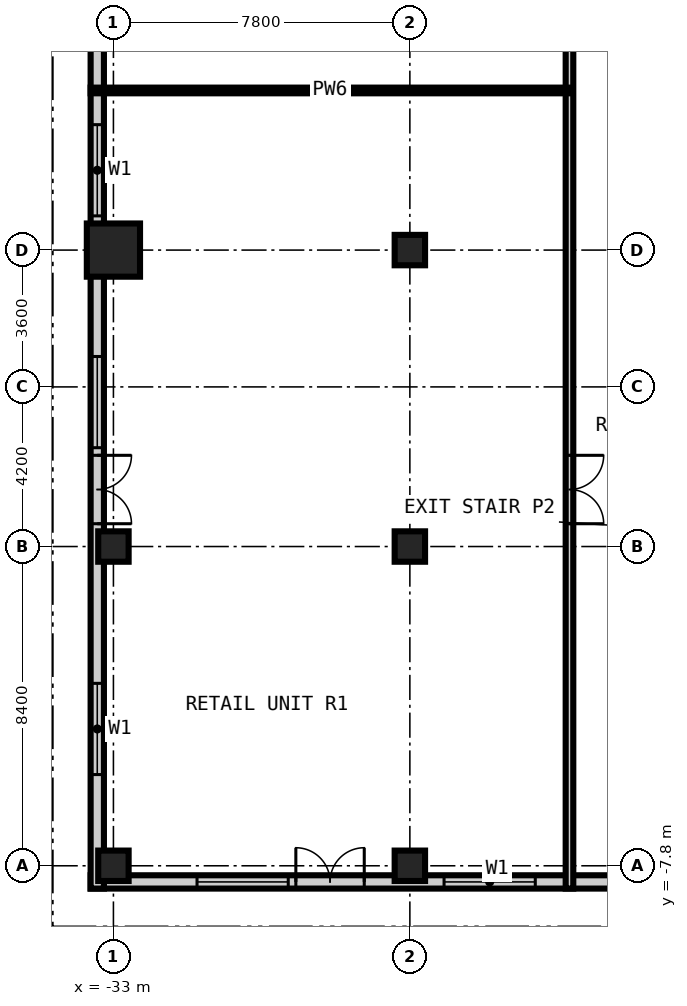
"""IFC4 building model, lengths in metres.
Left out: names, types, materials, properties, quantities, classifications, styles, units other than length and angle.
Written with IfcOpenShell. Run it as: python <this file> out.ifc"""

import sys

from ifc_helpers import new_model, si_unit, direction, frame, frame_2d, origin, origin_2d, place, context, subcontext, project, spatial, rectangle, extrude, element, fill, save


model = new_model("IFC4")
c1 = context("Model", 3, precision=1e-05, world=origin(), true_north=direction((0.0, 1.0)))
c2 = subcontext(c1, "Body", "Model", "MODEL_VIEW")
j1 = project(units=[si_unit("LENGTHUNIT", "METRE"), si_unit("PLANEANGLEUNIT", "RADIAN")], contexts=[c1])
p1 = place(None, origin())
s1 = spatial("IfcSite", under=j1, at=p1, CompositionType="ELEMENT")
p2 = place(p1, origin())
s2 = spatial("IfcBuilding", under=s1, at=p2, CompositionType="ELEMENT")
p3 = place(p2, origin())
s3 = spatial("IfcBuildingStorey", under=s2, at=p3, CompositionType="ELEMENT", Elevation=0.0)
for number, where, z_axis, x_axis in (
    (1, (-33.0, -7.8, -0.5), (0.0, 0.0, 1.0), (1.0, 0.0, 0.0)),
    (2, (-33.0, 0.6, -0.5), (0.0, 0.0, 1.0), (1.0, 0.0, 0.0)),
):
    element("IfcColumn", number, at=place(p3, frame(where, z_axis=z_axis, x_axis=x_axis)), inside=s3, PredefinedType="COLUMN", context=c2, shape_type="SweptSolid", body=[
        extrude(rectangle(XDim=0.8, YDim=0.8, at=origin_2d()), origin(), (0.0, 0.0, 1.0), 6.2),
    ])
p4 = place(p3, frame((-33.0, 8.4, -0.3), z_axis=(0.0, 0.0, 1.0), x_axis=(1.0, 0.0, 0.0)))
e3 = element("IfcColumn", 3, at=p4, inside=s3, PredefinedType="COLUMN", context=c2, shape_type="SweptSolid", body=[
    extrude(rectangle(XDim=1.4, YDim=1.4, at=origin_2d()), origin(), (0.0, 0.0, 1.0), 6.0),
])
for number, where, z_axis, x_axis in (
    (4, (-25.2, -7.8, -0.5), (0.0, 0.0, 1.0), (1.0, 0.0, 0.0)),
    (5, (-25.2, 0.6, -0.5), (0.0, 0.0, 1.0), (1.0, 0.0, 0.0)),
):
    element("IfcColumn", number, at=place(p3, frame(where, z_axis=z_axis, x_axis=x_axis)), inside=s3, PredefinedType="COLUMN", context=c2, shape_type="SweptSolid", body=[
        extrude(rectangle(XDim=0.8, YDim=0.8, at=origin_2d()), origin(), (0.0, 0.0, 1.0), 6.2),
    ])
p5 = place(p3, frame((-25.2, 8.4, -0.3), z_axis=(0.0, 0.0, 1.0), x_axis=(1.0, 0.0, 0.0)))
e6 = element("IfcColumn", 6, at=p5, inside=s3, PredefinedType="COLUMN", context=c2, shape_type="SweptSolid", body=[
    extrude(rectangle(XDim=0.8, YDim=0.8, at=origin_2d()), origin(), (0.0, 0.0, 1.0), 6.0),
])
p6 = place(p3, frame((-33.6, -8.225, 0.0), z_axis=(0.0, 0.0, 1.0), x_axis=(1.0, 0.0, 0.0)))
e7 = element("IfcWall", 7, at=p6, inside=s3, PredefinedType="SOLIDWALL", context=c2, shape_type="SweptSolid", body=[
    extrude(rectangle(XDim=92.4, YDim=0.35, at=frame_2d((46.2, 0.0))), origin(), (0.0, 0.0, 1.0), 5.7),
])
p7 = place(p6, frame((5.4, 0.0, 0.0)))
e8 = element("IfcOpeningElement", 8, at=p7, cuts=e7, PredefinedType="OPENING", context=c2, shape_type="SweptSolid", body=[
    extrude(rectangle(XDim=1.8, YDim=2.7, at=frame_2d((0.9, 1.35))), frame((0.0, 0.185, 0.0), z_axis=(0.0, -1.0, 0.0), x_axis=(1.0, 0.0, 0.0)), (0.0, 0.0, 1.0), 0.37),
])
p8 = place(p6, frame((2.8, 0.0, 0.9)))
e9 = element("IfcOpeningElement", 9, at=p8, cuts=e7, PredefinedType="OPENING", context=c2, shape_type="SweptSolid", body=[
    extrude(rectangle(XDim=2.4, YDim=2.4, at=frame_2d((1.2, 1.2))), frame((0.0, 0.185, 0.0), z_axis=(0.0, -1.0, 0.0), x_axis=(1.0, 0.0, 0.0)), (0.0, 0.0, 1.0), 0.37),
])
p9 = place(p6, frame((9.3, 0.0, 0.9)))
e10 = element("IfcOpeningElement", 10, at=p9, cuts=e7, PredefinedType="OPENING", context=c2, shape_type="SweptSolid", body=[
    extrude(rectangle(XDim=2.4, YDim=2.4, at=frame_2d((1.2, 1.2))), frame((0.0, 0.185, 0.0), z_axis=(0.0, -1.0, 0.0), x_axis=(1.0, 0.0, 0.0)), (0.0, 0.0, 1.0), 0.37),
])
p10 = place(p6, frame((13.8, 0.0, 0.9)))
e11 = element("IfcOpeningElement", 11, at=p10, cuts=e7, PredefinedType="OPENING", context=c2, shape_type="SweptSolid", body=[
    extrude(rectangle(XDim=2.4, YDim=2.4, at=frame_2d((1.2, 1.2))), frame((0.0, 0.185, 0.0), z_axis=(0.0, -1.0, 0.0), x_axis=(1.0, 0.0, 0.0)), (0.0, 0.0, 1.0), 0.37),
])
p11 = place(p6, frame((19.3, 0.0, 0.0)))
e12 = element("IfcOpeningElement", 12, at=p11, cuts=e7, PredefinedType="OPENING", context=c2, shape_type="SweptSolid", body=[
    extrude(rectangle(XDim=1.2, YDim=2.4, at=frame_2d((0.6, 1.2))), frame((0.0, 0.185, 0.0), z_axis=(0.0, -1.0, 0.0), x_axis=(1.0, 0.0, 0.0)), (0.0, 0.0, 1.0), 0.37),
])
p12 = place(p6, frame((26.8, 0.0, 0.0)))
e13 = element("IfcOpeningElement", 13, at=p12, cuts=e7, PredefinedType="OPENING", context=c2, shape_type="SweptSolid", body=[
    extrude(rectangle(XDim=2.4, YDim=3.0, at=frame_2d((1.2, 1.5))), frame((0.0, 0.185, 0.0), z_axis=(0.0, -1.0, 0.0), x_axis=(1.0, 0.0, 0.0)), (0.0, 0.0, 1.0), 0.37),
])
p13 = place(p6, frame((36.9, 0.0, 0.0)))
e14 = element("IfcOpeningElement", 14, at=p13, cuts=e7, PredefinedType="OPENING", context=c2, shape_type="SweptSolid", body=[
    extrude(rectangle(XDim=1.8, YDim=2.4, at=frame_2d((0.9, 1.2))), frame((0.0, 0.185, 0.0), z_axis=(0.0, -1.0, 0.0), x_axis=(1.0, 0.0, 0.0)), (0.0, 0.0, 1.0), 0.37),
])
p14 = place(p6, frame((38.9, 0.0, 0.9)))
e15 = element("IfcOpeningElement", 15, at=p14, cuts=e7, PredefinedType="OPENING", context=c2, shape_type="SweptSolid", body=[
    extrude(rectangle(XDim=2.4, YDim=2.4, at=frame_2d((1.2, 1.2))), frame((0.0, 0.185, 0.0), z_axis=(0.0, -1.0, 0.0), x_axis=(1.0, 0.0, 0.0)), (0.0, 0.0, 1.0), 0.37),
])
p15 = place(p6, frame((53.7, 0.0, 0.0)))
e16 = element("IfcOpeningElement", 16, at=p15, cuts=e7, PredefinedType="OPENING", context=c2, shape_type="SweptSolid", body=[
    extrude(rectangle(XDim=1.8, YDim=2.4, at=frame_2d((0.9, 1.2))), frame((0.0, 0.185, 0.0), z_axis=(0.0, -1.0, 0.0), x_axis=(1.0, 0.0, 0.0)), (0.0, 0.0, 1.0), 0.37),
])
p16 = place(p6, frame((51.1, 0.0, 0.9)))
e17 = element("IfcOpeningElement", 17, at=p16, cuts=e7, PredefinedType="OPENING", context=c2, shape_type="SweptSolid", body=[
    extrude(rectangle(XDim=2.4, YDim=2.4, at=frame_2d((1.2, 1.2))), frame((0.0, 0.185, 0.0), z_axis=(0.0, -1.0, 0.0), x_axis=(1.0, 0.0, 0.0)), (0.0, 0.0, 1.0), 0.37),
])
p17 = place(p6, frame((61.8, 0.0, 0.0)))
e18 = element("IfcOpeningElement", 18, at=p17, cuts=e7, PredefinedType="OPENING", context=c2, shape_type="SweptSolid", body=[
    extrude(rectangle(XDim=2.4, YDim=3.0, at=frame_2d((1.2, 1.5))), frame((0.0, 0.185, 0.0), z_axis=(0.0, -1.0, 0.0), x_axis=(1.0, 0.0, 0.0)), (0.0, 0.0, 1.0), 0.37),
])
p18 = place(p6, frame((72.7, 0.0, 0.9)))
e19 = element("IfcOpeningElement", 19, at=p18, cuts=e7, PredefinedType="OPENING", context=c2, shape_type="SweptSolid", body=[
    extrude(rectangle(XDim=2.4, YDim=2.4, at=frame_2d((1.2, 1.2))), frame((0.0, 0.185, 0.0), z_axis=(0.0, -1.0, 0.0), x_axis=(1.0, 0.0, 0.0)), (0.0, 0.0, 1.0), 0.37),
])
p19 = place(p6, frame((81.1, 0.0, 0.9)))
e20 = element("IfcOpeningElement", 20, at=p19, cuts=e7, PredefinedType="OPENING", context=c2, shape_type="SweptSolid", body=[
    extrude(rectangle(XDim=2.4, YDim=2.4, at=frame_2d((1.2, 1.2))), frame((0.0, 0.185, 0.0), z_axis=(0.0, -1.0, 0.0), x_axis=(1.0, 0.0, 0.0)), (0.0, 0.0, 1.0), 0.37),
])
p20 = place(p6, frame((88.9, 0.0, 0.9)))
e21 = element("IfcOpeningElement", 21, at=p20, cuts=e7, PredefinedType="OPENING", context=c2, shape_type="SweptSolid", body=[
    extrude(rectangle(XDim=2.4, YDim=2.4, at=frame_2d((1.2, 1.2))), frame((0.0, 0.185, 0.0), z_axis=(0.0, -1.0, 0.0), x_axis=(1.0, 0.0, 0.0)), (0.0, 0.0, 1.0), 0.37),
])
p21 = place(p3, frame((-33.425, 58.8, 0.0), z_axis=(0.0, 0.0, 1.0), x_axis=(0.0, -1.0, 0.0)))
e22 = element("IfcWall", 22, at=p21, inside=s3, PredefinedType="SOLIDWALL", context=c2, shape_type="SweptSolid", body=[
    extrude(rectangle(XDim=67.2, YDim=0.35, at=frame_2d((33.6, 0.0))), origin(), (0.0, 0.0, 1.0), 5.7),
])
p22 = place(p21, frame((55.8, 0.0, 0.0)))
e23 = element("IfcOpeningElement", 23, at=p22, cuts=e22, PredefinedType="OPENING", context=c2, shape_type="SweptSolid", body=[
    extrude(rectangle(XDim=1.8, YDim=2.7, at=frame_2d((0.9, 1.35))), frame((0.0, 0.185, 0.0), z_axis=(0.0, -1.0, 0.0), x_axis=(1.0, 0.0, 0.0)), (0.0, 0.0, 1.0), 0.37),
])
p23 = place(p21, frame((61.8, 0.0, 0.9)))
e24 = element("IfcOpeningElement", 24, at=p23, cuts=e22, PredefinedType="OPENING", context=c2, shape_type="SweptSolid", body=[
    extrude(rectangle(XDim=2.4, YDim=2.4, at=frame_2d((1.2, 1.2))), frame((0.0, 0.185, 0.0), z_axis=(0.0, -1.0, 0.0), x_axis=(1.0, 0.0, 0.0)), (0.0, 0.0, 1.0), 0.37),
])
p24 = place(p21, frame((53.2, 0.0, 0.9)))
e25 = element("IfcOpeningElement", 25, at=p24, cuts=e22, PredefinedType="OPENING", context=c2, shape_type="SweptSolid", body=[
    extrude(rectangle(XDim=2.4, YDim=2.4, at=frame_2d((1.2, 1.2))), frame((0.0, 0.185, 0.0), z_axis=(0.0, -1.0, 0.0), x_axis=(1.0, 0.0, 0.0)), (0.0, 0.0, 1.0), 0.37),
])
p25 = place(p21, frame((47.1, 0.0, 0.9)))
e26 = element("IfcOpeningElement", 26, at=p25, cuts=e22, PredefinedType="OPENING", context=c2, shape_type="SweptSolid", body=[
    extrude(rectangle(XDim=2.4, YDim=2.4, at=frame_2d((1.2, 1.2))), frame((0.0, 0.185, 0.0), z_axis=(0.0, -1.0, 0.0), x_axis=(1.0, 0.0, 0.0)), (0.0, 0.0, 1.0), 0.37),
])
p26 = place(p21, frame((34.8, 0.0, 0.0)))
e27 = element("IfcOpeningElement", 27, at=p26, cuts=e22, PredefinedType="OPENING", context=c2, shape_type="SweptSolid", body=[
    extrude(rectangle(XDim=1.8, YDim=2.7, at=frame_2d((0.9, 1.35))), frame((0.0, 0.185, 0.0), z_axis=(0.0, -1.0, 0.0), x_axis=(1.0, 0.0, 0.0)), (0.0, 0.0, 1.0), 0.37),
])
p27 = place(p21, frame((38.8, 0.0, 0.9)))
e28 = element("IfcOpeningElement", 28, at=p27, cuts=e22, PredefinedType="OPENING", context=c2, shape_type="SweptSolid", body=[
    extrude(rectangle(XDim=2.4, YDim=2.4, at=frame_2d((1.2, 1.2))), frame((0.0, 0.185, 0.0), z_axis=(0.0, -1.0, 0.0), x_axis=(1.0, 0.0, 0.0)), (0.0, 0.0, 1.0), 0.37),
])
p28 = place(p21, frame((30.4, 0.0, 0.9)))
e29 = element("IfcOpeningElement", 29, at=p28, cuts=e22, PredefinedType="OPENING", context=c2, shape_type="SweptSolid", body=[
    extrude(rectangle(XDim=2.4, YDim=2.4, at=frame_2d((1.2, 1.2))), frame((0.0, 0.185, 0.0), z_axis=(0.0, -1.0, 0.0), x_axis=(1.0, 0.0, 0.0)), (0.0, 0.0, 1.0), 0.37),
])
p29 = place(p21, frame((26.1, 0.0, 0.9)))
e30 = element("IfcOpeningElement", 30, at=p29, cuts=e22, PredefinedType="OPENING", context=c2, shape_type="SweptSolid", body=[
    extrude(rectangle(XDim=2.4, YDim=2.4, at=frame_2d((1.2, 1.2))), frame((0.0, 0.185, 0.0), z_axis=(0.0, -1.0, 0.0), x_axis=(1.0, 0.0, 0.0)), (0.0, 0.0, 1.0), 0.37),
])
p30 = place(p21, frame((11.7, 0.0, 0.0)))
e31 = element("IfcOpeningElement", 31, at=p30, cuts=e22, PredefinedType="OPENING", context=c2, shape_type="SweptSolid", body=[
    extrude(rectangle(XDim=1.8, YDim=2.7, at=frame_2d((0.9, 1.35))), frame((0.0, 0.185, 0.0), z_axis=(0.0, -1.0, 0.0), x_axis=(1.0, 0.0, 0.0)), (0.0, 0.0, 1.0), 0.37),
])
p31 = place(p21, frame((19.8, 0.0, 0.9)))
e32 = element("IfcOpeningElement", 32, at=p31, cuts=e22, PredefinedType="OPENING", context=c2, shape_type="SweptSolid", body=[
    extrude(rectangle(XDim=2.4, YDim=2.4, at=frame_2d((1.2, 1.2))), frame((0.0, 0.185, 0.0), z_axis=(0.0, -1.0, 0.0), x_axis=(1.0, 0.0, 0.0)), (0.0, 0.0, 1.0), 0.37),
])
p32 = place(p21, frame((9.1, 0.0, 0.9)))
e33 = element("IfcOpeningElement", 33, at=p32, cuts=e22, PredefinedType="OPENING", context=c2, shape_type="SweptSolid", body=[
    extrude(rectangle(XDim=2.4, YDim=2.4, at=frame_2d((1.2, 1.2))), frame((0.0, 0.185, 0.0), z_axis=(0.0, -1.0, 0.0), x_axis=(1.0, 0.0, 0.0)), (0.0, 0.0, 1.0), 0.37),
])
p33 = place(p21, frame((3.0, 0.0, 0.9)))
e34 = element("IfcOpeningElement", 34, at=p33, cuts=e22, PredefinedType="OPENING", context=c2, shape_type="SweptSolid", body=[
    extrude(rectangle(XDim=2.4, YDim=2.4, at=frame_2d((1.2, 1.2))), frame((0.0, 0.185, 0.0), z_axis=(0.0, -1.0, 0.0), x_axis=(1.0, 0.0, 0.0)), (0.0, 0.0, 1.0), 0.37),
])
p34 = place(p3, frame((-21.0, 58.8, 0.0), z_axis=(0.0, 0.0, 1.0), x_axis=(0.0, -1.0, 0.0)))
e35 = element("IfcWall", 35, at=p34, inside=s3, PredefinedType="PARTITIONING", context=c2, shape_type="SweptSolid", body=[
    extrude(rectangle(XDim=67.2, YDim=0.2, at=frame_2d((33.6, 0.0))), origin(), (0.0, 0.0, 1.0), 5.7),
])
p35 = place(p34, frame((55.8, 0.0, 0.0)))
e36 = element("IfcOpeningElement", 36, at=p35, cuts=e35, PredefinedType="OPENING", context=c2, shape_type="SweptSolid", body=[
    extrude(rectangle(XDim=1.8, YDim=2.7, at=frame_2d((0.9, 1.35))), frame((0.0, 0.11, 0.0), z_axis=(0.0, -1.0, 0.0), x_axis=(1.0, 0.0, 0.0)), (0.0, 0.0, 1.0), 0.22),
])
p36 = place(p34, frame((34.8, 0.0, 0.0)))
e37 = element("IfcOpeningElement", 37, at=p36, cuts=e35, PredefinedType="OPENING", context=c2, shape_type="SweptSolid", body=[
    extrude(rectangle(XDim=1.8, YDim=2.7, at=frame_2d((0.9, 1.35))), frame((0.0, 0.11, 0.0), z_axis=(0.0, -1.0, 0.0), x_axis=(1.0, 0.0, 0.0)), (0.0, 0.0, 1.0), 0.22),
])
p37 = place(p34, frame((11.7, 0.0, 0.0)))
e38 = element("IfcOpeningElement", 38, at=p37, cuts=e35, PredefinedType="OPENING", context=c2, shape_type="SweptSolid", body=[
    extrude(rectangle(XDim=1.8, YDim=2.7, at=frame_2d((0.9, 1.35))), frame((0.0, 0.11, 0.0), z_axis=(0.0, -1.0, 0.0), x_axis=(1.0, 0.0, 0.0)), (0.0, 0.0, 1.0), 0.22),
])
p38 = place(p3, frame((-33.6, 12.6, 0.0), z_axis=(0.0, 0.0, 1.0), x_axis=(1.0, 0.0, 0.0)))
e39 = element("IfcWall", 39, at=p38, inside=s3, PredefinedType="PARTITIONING", context=c2, shape_type="SweptSolid", body=[
    extrude(rectangle(XDim=12.6, YDim=0.15, at=frame_2d((6.3, 0.0))), origin(), (0.0, 0.0, 1.0), 5.7),
])
p39 = place(p7, origin())
e40 = element("IfcDoor", 40, at=p39, inside=s3, OperationType="DOUBLE_DOOR_DOUBLE_SWING", PredefinedType="DOOR", context=c2, shape_type="SweptSolid", body=[
    extrude(rectangle(XDim=1.8, YDim=2.7, at=frame_2d((0.9, 1.35))), frame((0.0, 0.025, 0.0), z_axis=(0.0, -1.0, 0.0), x_axis=(1.0, 0.0, 0.0)), (0.0, 0.0, 1.0), 0.05),
])
fill(e8, e40)
p40 = place(p8, origin())
e41 = element("IfcWindow", 41, at=p40, inside=s3, PartitioningType="SINGLE_PANEL", PredefinedType="WINDOW", context=c2, shape_type="SweptSolid", body=[
    extrude(rectangle(XDim=2.4, YDim=2.4, at=frame_2d((1.2, 1.2))), frame((0.0, 0.03, 0.0), z_axis=(0.0, -1.0, 0.0), x_axis=(1.0, 0.0, 0.0)), (0.0, 0.0, 1.0), 0.06),
])
fill(e9, e41)
p41 = place(p9, origin())
e42 = element("IfcWindow", 42, at=p41, inside=s3, PartitioningType="SINGLE_PANEL", PredefinedType="WINDOW", context=c2, shape_type="SweptSolid", body=[
    extrude(rectangle(XDim=2.4, YDim=2.4, at=frame_2d((1.2, 1.2))), frame((0.0, 0.03, 0.0), z_axis=(0.0, -1.0, 0.0), x_axis=(1.0, 0.0, 0.0)), (0.0, 0.0, 1.0), 0.06),
])
fill(e10, e42)
p42 = place(p22, origin())
e43 = element("IfcDoor", 43, at=p42, inside=s3, OperationType="DOUBLE_DOOR_DOUBLE_SWING", PredefinedType="DOOR", context=c2, shape_type="SweptSolid", body=[
    extrude(rectangle(XDim=1.8, YDim=2.7, at=frame_2d((0.9, 1.35))), frame((0.0, 0.025, 0.0), z_axis=(0.0, -1.0, 0.0), x_axis=(1.0, 0.0, 0.0)), (0.0, 0.0, 1.0), 0.05),
])
fill(e23, e43)
p43 = place(p23, origin())
e44 = element("IfcWindow", 44, at=p43, inside=s3, PartitioningType="SINGLE_PANEL", PredefinedType="WINDOW", context=c2, shape_type="SweptSolid", body=[
    extrude(rectangle(XDim=2.4, YDim=2.4, at=frame_2d((1.2, 1.2))), frame((0.0, 0.03, 0.0), z_axis=(0.0, -1.0, 0.0), x_axis=(1.0, 0.0, 0.0)), (0.0, 0.0, 1.0), 0.06),
])
fill(e24, e44)
p44 = place(p24, origin())
e45 = element("IfcWindow", 45, at=p44, inside=s3, PartitioningType="SINGLE_PANEL", PredefinedType="WINDOW", context=c2, shape_type="SweptSolid", body=[
    extrude(rectangle(XDim=2.4, YDim=2.4, at=frame_2d((1.2, 1.2))), frame((0.0, 0.03, 0.0), z_axis=(0.0, -1.0, 0.0), x_axis=(1.0, 0.0, 0.0)), (0.0, 0.0, 1.0), 0.06),
])
fill(e25, e45)
p45 = place(p25, origin())
e46 = element("IfcWindow", 46, at=p45, inside=s3, PartitioningType="SINGLE_PANEL", PredefinedType="WINDOW", context=c2, shape_type="SweptSolid", body=[
    extrude(rectangle(XDim=2.4, YDim=2.4, at=frame_2d((1.2, 1.2))), frame((0.0, 0.03, 0.0), z_axis=(0.0, -1.0, 0.0), x_axis=(1.0, 0.0, 0.0)), (0.0, 0.0, 1.0), 0.06),
])
fill(e26, e46)
p46 = place(p35, origin())
e47 = element("IfcDoor", 47, at=p46, inside=s3, OperationType="DOUBLE_DOOR_DOUBLE_SWING", PredefinedType="DOOR", context=c2, shape_type="SweptSolid", body=[
    extrude(rectangle(XDim=1.8, YDim=2.7, at=frame_2d((0.9, 1.35))), frame((0.0, 0.025, 0.0), z_axis=(0.0, -1.0, 0.0), x_axis=(1.0, 0.0, 0.0)), (0.0, 0.0, 1.0), 0.05),
])
fill(e36, e47)
save(model, sys.argv[1])
